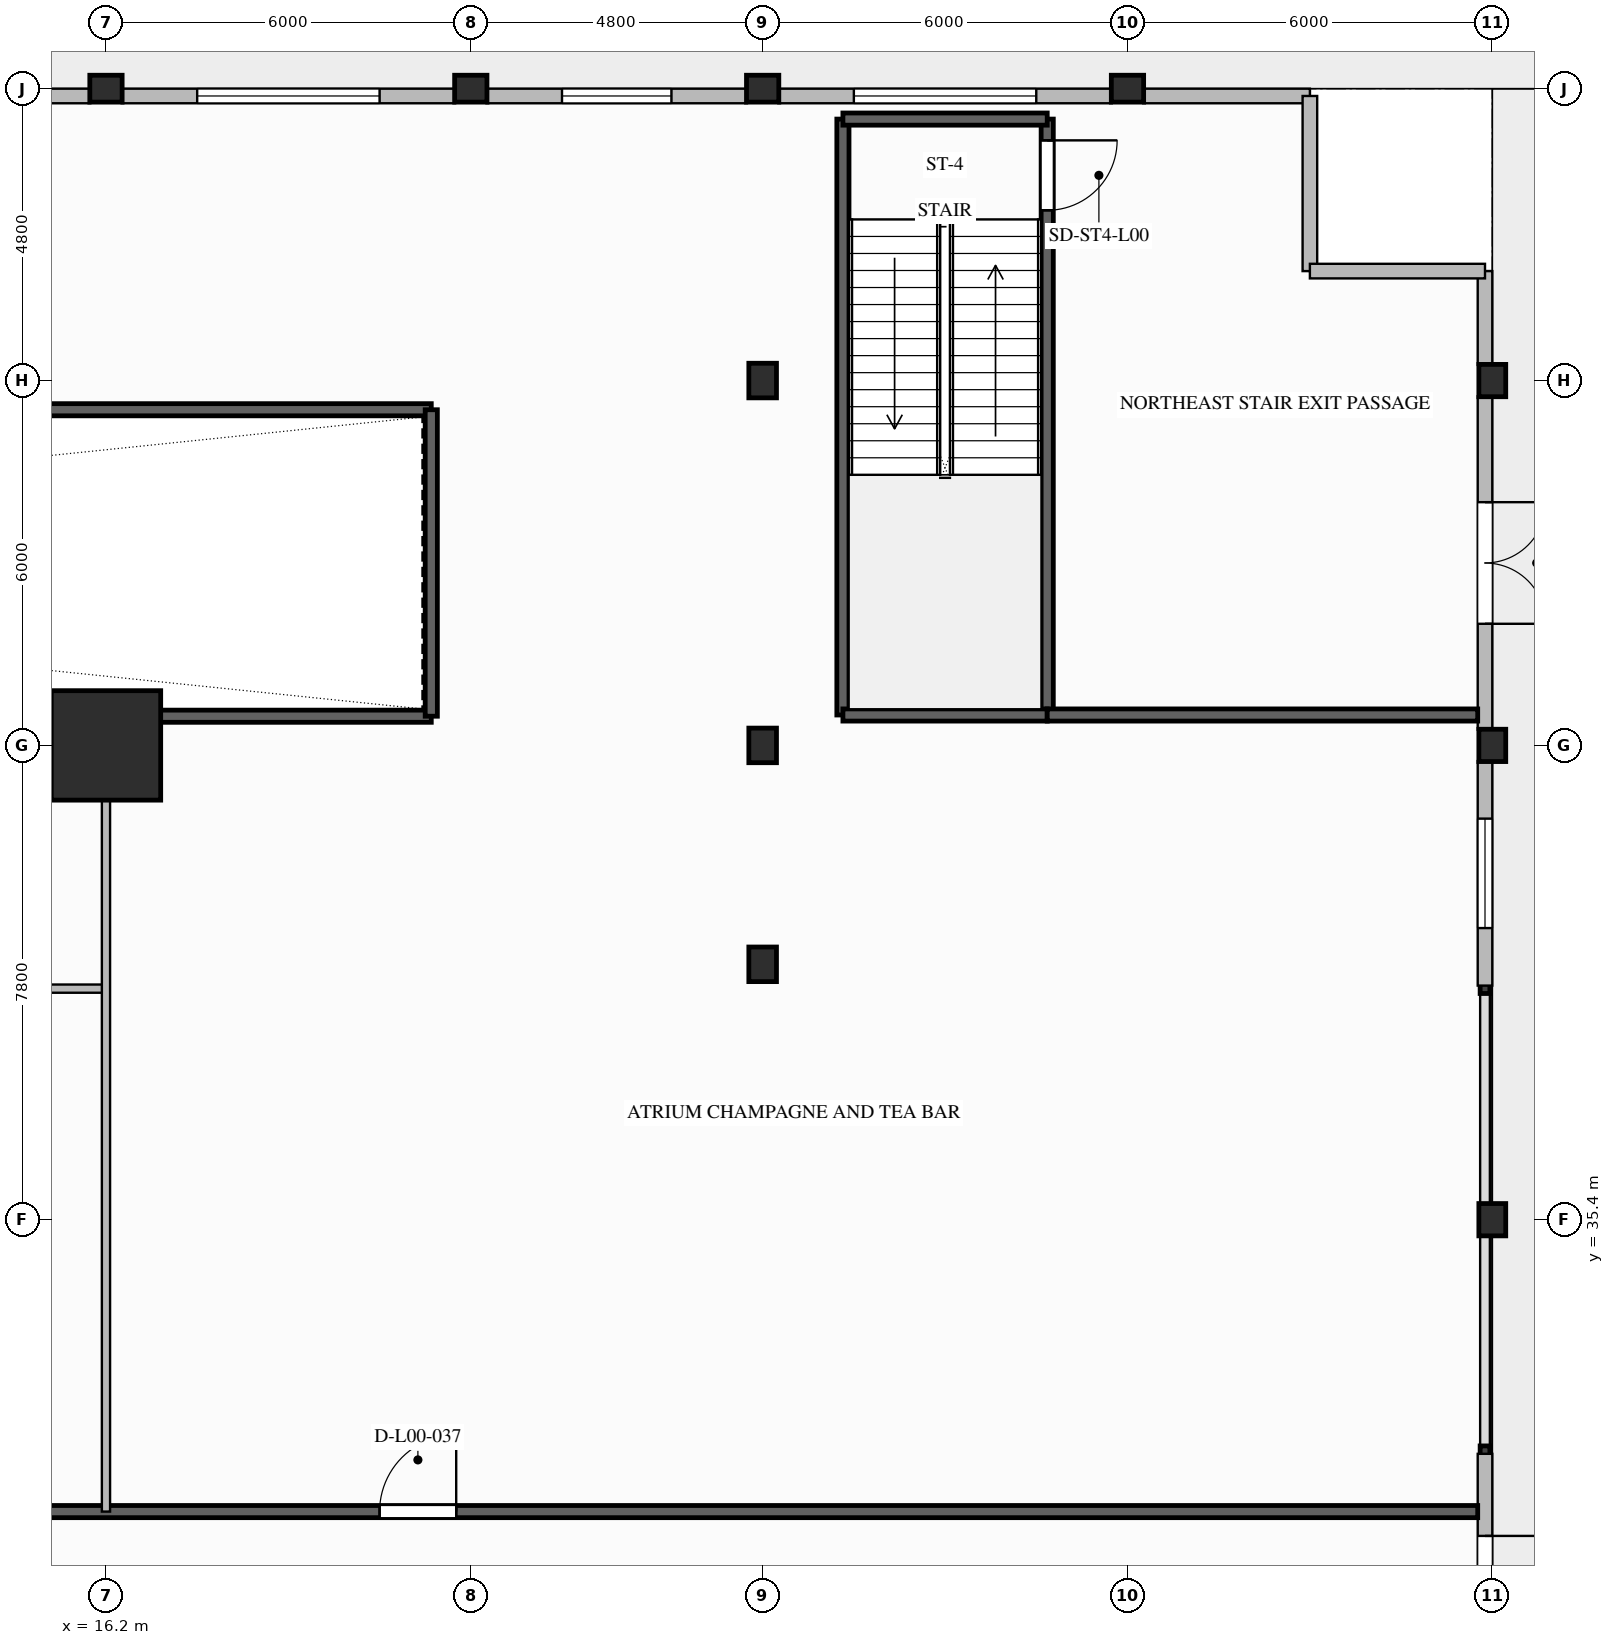
"""IFC4 building model, lengths in metres.
Left out: names, types, materials, properties, quantities, classifications, styles, units other than length and angle.
Written with IfcOpenShell. Run it as: python <this file> out.ifc"""

import sys

from ifc_helpers import new_model, si_unit, direction, frame, frame_2d, origin, origin_2d, place, context, subcontext, project, spatial, rectangle, i_section, extrude, element, fill, save


model = new_model("IFC4")
c1 = context("Model", 3, precision=1e-05, world=origin(), true_north=direction((0.0, 1.0)))
c2 = subcontext(c1, "Body", "Model", "MODEL_VIEW")
j1 = project(units=[si_unit("LENGTHUNIT", "METRE"), si_unit("PLANEANGLEUNIT", "RADIAN")], contexts=[c1])
p1 = place(None, origin())
s1 = spatial("IfcSite", under=j1, at=p1, CompositionType="ELEMENT")
p2 = place(p1, origin())
s2 = spatial("IfcBuilding", under=s1, at=p2, CompositionType="ELEMENT")
p3 = place(p2, origin())
s3 = spatial("IfcBuildingStorey", under=s2, at=p3, CompositionType="ELEMENT", Elevation=0.0)
p4 = place(p3, frame((16.2, 43.2, 0.0), z_axis=(0.0, 0.0, 1.0), x_axis=(1.0, 0.0, 0.0)))
e1 = element("IfcColumn", 1, at=p4, inside=s3, PredefinedType="COLUMN", context=c2, shape_type="SweptSolid", body=[
    extrude(rectangle(XDim=1.8, YDim=1.8, at=origin_2d()), origin(), (0.0, 0.0, 1.0), 5.6),
])
for number, where, z_axis, x_axis in (
    (2, (39.0, 35.4, 0.0), (0.0, 0.0, 1.0), (1.0, 0.0, 0.0)),
    (3, (39.0, 43.2, 0.0), (0.0, 0.0, 1.0), (1.0, 0.0, 0.0)),
    (4, (39.0, 49.2, 0.0), (0.0, 0.0, 1.0), (1.0, 0.0, 0.0)),
    (5, (16.2, 54.0, 0.0), (0.0, 0.0, 1.0), (0.0, 1.0, 0.0)),
    (6, (22.2, 54.0, 0.0), (0.0, 0.0, 1.0), (0.0, 1.0, 0.0)),
    (7, (27.0, 54.0, 0.0), (0.0, 0.0, 1.0), (0.0, 1.0, 0.0)),
    (8, (33.0, 54.0, 0.0), (0.0, 0.0, 1.0), (0.0, 1.0, 0.0)),
):
    element("IfcColumn", number, at=place(p3, frame(where, z_axis=z_axis, x_axis=x_axis)), inside=s3, PredefinedType="COLUMN", context=c2, shape_type="SweptSolid", body=[
        extrude(i_section(OverallWidth=0.442, OverallDepth=0.531, WebThickness=0.066, FlangeThickness=0.106, FilletRadius=0.03, at=origin_2d()), origin(), (0.0, 0.0, 1.0), 5.6),
    ])
for number, where, z_axis, x_axis in (
    (9, (27.0, 39.6, 0.0), (0.0, 0.0, 1.0), (1.0, 0.0, 0.0)),
    (10, (27.0, 43.2, 0.0), (0.0, 0.0, 1.0), (1.0, 0.0, 0.0)),
    (11, (27.0, 49.2, 0.0), (0.0, 0.0, 1.0), (1.0, 0.0, 0.0)),
):
    element("IfcColumn", number, at=place(p3, frame(where, z_axis=z_axis, x_axis=x_axis)), inside=s3, PredefinedType="COLUMN", context=c2, shape_type="SweptSolid", body=[
        extrude(i_section(OverallWidth=0.454, OverallDepth=0.569, WebThickness=0.078, FlangeThickness=0.125, FilletRadius=0.03, at=origin_2d()), origin(), (0.0, 0.0, 1.0), 5.6),
    ])
p5 = place(p3, frame((38.88, 31.55, 0.0), z_axis=(0.0, 0.0, 1.0), x_axis=(0.0, -1.0, 0.0)))
e12 = element("IfcWall", 12, at=p5, inside=s3, PredefinedType="STANDARD", context=c2, shape_type="SweptSolid", body=[
    extrude(rectangle(XDim=4.292, YDim=0.24, at=frame_2d((2.146, 0.0))), origin(), (0.0, 0.0, 1.0), 4.604),
])
p6 = place(p5, frame((1.35, 0.0, 0.0)))
e13 = element("IfcOpeningElement", 13, at=p6, cuts=e12, PredefinedType="OPENING", context=c2, shape_type="SweptSolid", body=[
    extrude(rectangle(XDim=2.0, YDim=2.4, at=frame_2d((1.0, 1.2))), frame((0.0, 0.13, 0.0), z_axis=(0.0, -1.0, 0.0), x_axis=(1.0, 0.0, 0.0)), (0.0, 0.0, 1.0), 0.26),
])
p7 = place(p3, frame((38.88, 42.942, 0.0), z_axis=(0.0, 0.0, 1.0), x_axis=(0.0, -1.0, 0.0)))
e14 = element("IfcWall", 14, at=p7, inside=s3, PredefinedType="STANDARD", context=c2, shape_type="SweptSolid", body=[
    extrude(rectangle(XDim=3.692, YDim=0.24, at=frame_2d((1.846, 0.0))), origin(), (0.0, 0.0, 1.0), 4.604),
])
p8 = place(p7, frame((0.946, 0.0, 0.9)))
e15 = element("IfcOpeningElement", 15, at=p8, cuts=e14, PredefinedType="OPENING", context=c2, shape_type="SweptSolid", body=[
    extrude(rectangle(XDim=1.8, YDim=2.4, at=frame_2d((0.9, 1.2))), frame((0.0, 0.13, 0.0), z_axis=(0.0, -1.0, 0.0), x_axis=(1.0, 0.0, 0.0)), (0.0, 0.0, 1.0), 0.26),
])
p9 = place(p3, frame((38.88, 48.942, 0.0), z_axis=(0.0, 0.0, 1.0), x_axis=(0.0, -1.0, 0.0)))
e16 = element("IfcWall", 16, at=p9, inside=s3, PredefinedType="STANDARD", context=c2, shape_type="SweptSolid", body=[
    extrude(rectangle(XDim=5.485, YDim=0.24, at=frame_2d((2.742, 0.0))), origin(), (0.0, 0.0, 1.0), 4.604),
])
p10 = place(p9, frame((1.742, 0.0, 0.0)))
e17 = element("IfcOpeningElement", 17, at=p10, cuts=e16, PredefinedType="OPENING", context=c2, shape_type="SweptSolid", body=[
    extrude(rectangle(XDim=2.0, YDim=2.4, at=frame_2d((1.0, 1.2))), frame((0.0, 0.13, 0.0), z_axis=(0.0, -1.0, 0.0), x_axis=(1.0, 0.0, 0.0)), (0.0, 0.0, 1.0), 0.26),
])
p11 = place(p3, frame((38.88, 51.0, 0.0), z_axis=(0.0, 0.0, 1.0), x_axis=(0.0, -1.0, 0.0)))
e18 = element("IfcWall", 18, at=p11, inside=s3, PredefinedType="STANDARD", context=c2, shape_type="SweptSolid", body=[
    extrude(rectangle(XDim=1.542, YDim=0.24, at=frame_2d((0.771, 0.0))), origin(), (0.0, 0.0, 1.0), 5.3),
])
p12 = place(p3, frame((8.658, 53.88, 0.0), z_axis=(0.0, 0.0, 1.0), x_axis=(1.0, 0.0, 0.0)))
e19 = element("IfcWall", 19, at=p12, inside=s3, PredefinedType="STANDARD", context=c2, shape_type="SweptSolid", body=[
    extrude(rectangle(XDim=7.285, YDim=0.24, at=frame_2d((3.642, 0.0))), origin(), (0.0, 0.0, 1.0), 4.604),
])
p13 = place(p12, frame((2.142, 0.0, 0.65)))
e20 = element("IfcOpeningElement", 20, at=p13, cuts=e19, PredefinedType="OPENING", context=c2, shape_type="SweptSolid", body=[
    extrude(rectangle(XDim=3.0, YDim=2.2, at=frame_2d((1.5, 1.1))), frame((0.0, 0.13, 0.0), z_axis=(0.0, -1.0, 0.0), x_axis=(1.0, 0.0, 0.0)), (0.0, 0.0, 1.0), 0.26),
])
p14 = place(p3, frame((16.458, 53.88, 0.0), z_axis=(0.0, 0.0, 1.0), x_axis=(1.0, 0.0, 0.0)))
e21 = element("IfcWall", 21, at=p14, inside=s3, PredefinedType="STANDARD", context=c2, shape_type="SweptSolid", body=[
    extrude(rectangle(XDim=5.485, YDim=0.24, at=frame_2d((2.742, 0.0))), origin(), (0.0, 0.0, 1.0), 4.604),
])
p15 = place(p14, frame((1.242, 0.0, 0.65)))
e22 = element("IfcOpeningElement", 22, at=p15, cuts=e21, PredefinedType="OPENING", context=c2, shape_type="SweptSolid", body=[
    extrude(rectangle(XDim=3.0, YDim=2.2, at=frame_2d((1.5, 1.1))), frame((0.0, 0.13, 0.0), z_axis=(0.0, -1.0, 0.0), x_axis=(1.0, 0.0, 0.0)), (0.0, 0.0, 1.0), 0.26),
])
p16 = place(p3, frame((22.458, 53.88, 0.0), z_axis=(0.0, 0.0, 1.0), x_axis=(1.0, 0.0, 0.0)))
e23 = element("IfcWall", 23, at=p16, inside=s3, PredefinedType="STANDARD", context=c2, shape_type="SweptSolid", body=[
    extrude(rectangle(XDim=4.284, YDim=0.24, at=frame_2d((2.142, 0.0))), origin(), (0.0, 0.0, 1.0), 4.604),
])
p17 = place(p16, frame((1.242, 0.0, 0.65)))
e24 = element("IfcOpeningElement", 24, at=p17, cuts=e23, PredefinedType="OPENING", context=c2, shape_type="SweptSolid", body=[
    extrude(rectangle(XDim=1.8, YDim=2.2, at=frame_2d((0.9, 1.1))), frame((0.0, 0.13, 0.0), z_axis=(0.0, -1.0, 0.0), x_axis=(1.0, 0.0, 0.0)), (0.0, 0.0, 1.0), 0.26),
])
p18 = place(p3, frame((27.258, 53.88, 0.0), z_axis=(0.0, 0.0, 1.0), x_axis=(1.0, 0.0, 0.0)))
e25 = element("IfcWall", 25, at=p18, inside=s3, PredefinedType="STANDARD", context=c2, shape_type="SweptSolid", body=[
    extrude(rectangle(XDim=5.484, YDim=0.24, at=frame_2d((2.742, 0.0))), origin(), (0.0, 0.0, 1.0), 4.604),
])
p19 = place(p18, frame((1.242, 0.0, 0.65)))
e26 = element("IfcOpeningElement", 26, at=p19, cuts=e25, PredefinedType="OPENING", context=c2, shape_type="SweptSolid", body=[
    extrude(rectangle(XDim=3.0, YDim=2.2, at=frame_2d((1.5, 1.1))), frame((0.0, 0.13, 0.0), z_axis=(0.0, -1.0, 0.0), x_axis=(1.0, 0.0, 0.0)), (0.0, 0.0, 1.0), 0.26),
])
p20 = place(p3, frame((33.258, 53.88, 0.0), z_axis=(0.0, 0.0, 1.0), x_axis=(1.0, 0.0, 0.0)))
e27 = element("IfcWall", 27, at=p20, inside=s3, PredefinedType="STANDARD", context=c2, shape_type="SweptSolid", body=[
    extrude(rectangle(XDim=2.742, YDim=0.24, at=frame_2d((1.371, 0.0))), origin(), (0.0, 0.0, 1.0), 5.3),
])
for number, where, z_axis, x_axis in (
    (28, (36.0, 53.88, 0.0), (0.0, 0.0, 1.0), (0.0, -1.0, 0.0)),
    (29, (36.0, 51.0, 0.0), (0.0, 0.0, 1.0), (1.0, 0.0, 0.0)),
):
    element("IfcWall", number, at=place(p3, frame(where, z_axis=z_axis, x_axis=x_axis)), inside=s3, PredefinedType="STANDARD", context=c2, shape_type="SweptSolid", body=[
        extrude(rectangle(XDim=2.88, YDim=0.24, at=frame_2d((1.44, 0.0))), origin(), (0.0, 0.0, 1.0), 5.3),
    ])
p21 = place(p3, frame((28.32, 43.7, 0.0), z_axis=(0.0, 0.0, 1.0), x_axis=(0.0, 1.0, 0.0)))
e30 = element("IfcWall", 30, at=p21, inside=s3, PredefinedType="SOLIDWALL", context=c2, shape_type="SweptSolid", body=[
    extrude(rectangle(XDim=9.8, YDim=0.2, at=frame_2d((4.9, 0.0))), origin(), (0.0, 0.0, 1.0), 5.3),
])
p22 = place(p3, frame((31.68, 53.5, 0.0), z_axis=(0.0, 0.0, 1.0), x_axis=(0.0, -1.0, 0.0)))
e31 = element("IfcWall", 31, at=p22, inside=s3, PredefinedType="SOLIDWALL", context=c2, shape_type="SweptSolid", body=[
    extrude(rectangle(XDim=9.8, YDim=0.2, at=frame_2d((4.9, 0.0))), origin(), (0.0, 0.0, 1.0), 5.3),
])
p23 = place(p22, frame((0.35, 0.0, 0.0)))
e32 = element("IfcOpeningElement", 32, at=p23, cuts=e31, PredefinedType="OPENING", context=c2, shape_type="SweptSolid", body=[
    extrude(rectangle(XDim=1.15, YDim=2.15, at=frame_2d((0.575, 1.075))), frame((0.0, 0.11, 0.0), z_axis=(0.0, -1.0, 0.0), x_axis=(1.0, 0.0, 0.0)), (0.0, 0.0, 1.0), 0.22),
])
for number, where, z_axis, x_axis in (
    (33, (28.32, 43.7, 0.0), (0.0, 0.0, 1.0), (1.0, 0.0, 0.0)),
    (34, (31.68, 53.5, 0.0), (0.0, 0.0, 1.0), (-1.0, 0.0, 0.0)),
):
    element("IfcWall", number, at=place(p3, frame(where, z_axis=z_axis, x_axis=x_axis)), inside=s3, PredefinedType="SOLIDWALL", context=c2, shape_type="SweptSolid", body=[
        extrude(rectangle(XDim=3.36, YDim=0.2, at=frame_2d((1.68, 0.0))), origin(), (0.0, 0.0, 1.0), 5.3),
    ])
for number, where, z_axis, x_axis in (
    (35, (-26.76, 43.68, 0.0), (0.0, 0.0, 1.0), (1.0, 0.0, 0.0)),
    (36, (-26.76, 48.72, 0.0), (0.0, 0.0, 1.0), (1.0, 0.0, 0.0)),
):
    element("IfcWall", number, at=place(p3, frame(where, z_axis=z_axis, x_axis=x_axis)), inside=s3, PredefinedType="SOLIDWALL", context=c2, shape_type="SweptSolid", body=[
        extrude(rectangle(XDim=48.31, YDim=0.2, at=frame_2d((24.155, 0.0))), origin(), (0.0, 0.0, 1.0), 5.3),
    ])
p24 = place(p3, frame((21.55, 43.68, 0.0), z_axis=(0.0, 0.0, 1.0), x_axis=(0.0, 1.0, 0.0)))
e37 = element("IfcWall", 37, at=p24, inside=s3, PredefinedType="SOLIDWALL", context=c2, shape_type="SweptSolid", body=[
    extrude(rectangle(XDim=5.04, YDim=0.2, at=frame_2d((2.52, 0.0))), origin(), (0.0, 0.0, 1.0), 5.3),
])
p25 = place(p3, frame((31.68, 43.7, 0.0), z_axis=(0.0, 0.0, 1.0), x_axis=(1.0, 0.0, 0.0)))
e38 = element("IfcWall", 38, at=p25, inside=s3, PredefinedType="SOLIDWALL", context=c2, shape_type="SweptSolid", body=[
    extrude(rectangle(XDim=7.08, YDim=0.2, at=frame_2d((3.54, 0.0))), origin(), (0.0, 0.0, 1.0), 5.3),
])
p26 = place(p3, frame((8.7, 30.6, 0.0), z_axis=(0.0, 0.0, 1.0), x_axis=(1.0, 0.0, 0.0)))
e39 = element("IfcWall", 39, at=p26, inside=s3, PredefinedType="SOLIDWALL", context=c2, shape_type="SweptSolid", body=[
    extrude(rectangle(XDim=30.06, YDim=0.2, at=frame_2d((15.03, 0.0))), origin(), (0.0, 0.0, 1.0), 5.3),
])
p27 = place(p26, frame((12.0, 0.0, 0.0)))
e40 = element("IfcOpeningElement", 40, at=p27, cuts=e39, PredefinedType="OPENING", context=c2, shape_type="SweptSolid", body=[
    extrude(rectangle(XDim=1.26, YDim=2.2, at=frame_2d((0.63, 1.1))), frame((0.0, 0.11, 0.0), z_axis=(0.0, -1.0, 0.0), x_axis=(1.0, 0.0, 0.0)), (0.0, 0.0, 1.0), 0.22),
])
p28 = place(p3, frame((-16.2, 39.2, 0.0), z_axis=(0.0, 0.0, 1.0), x_axis=(1.0, 0.0, 0.0)))
e41 = element("IfcWall", 41, at=p28, inside=s3, PredefinedType="PARTITIONING", context=c2, shape_type="SweptSolid", body=[
    extrude(rectangle(XDim=32.4, YDim=0.135, at=frame_2d((16.2, 0.0))), origin(), (0.0, 0.0, 1.0), 5.3),
])
p29 = place(p28, frame((6.0, 0.0, 0.0)))
e42 = element("IfcOpeningElement", 42, at=p29, cuts=e41, PredefinedType="OPENING", context=c2, shape_type="SweptSolid", body=[
    extrude(rectangle(XDim=1.02, YDim=2.15, at=frame_2d((0.51, 1.075))), frame((0.0, 0.077, 0.0), z_axis=(0.0, -1.0, 0.0), x_axis=(1.0, 0.0, 0.0)), (0.0, 0.0, 1.0), 0.155),
])
p30 = place(p28, frame((18.8, 0.0, 0.0)))
e43 = element("IfcOpeningElement", 43, at=p30, cuts=e41, PredefinedType="OPENING", context=c2, shape_type="SweptSolid", body=[
    extrude(rectangle(XDim=0.92, YDim=2.1, at=frame_2d((0.46, 1.05))), frame((0.0, 0.077, 0.0), z_axis=(0.0, -1.0, 0.0), x_axis=(1.0, 0.0, 0.0)), (0.0, 0.0, 1.0), 0.155),
])
p31 = place(p28, frame((24.5, 0.0, 0.0)))
e44 = element("IfcOpeningElement", 44, at=p31, cuts=e41, PredefinedType="OPENING", context=c2, shape_type="SweptSolid", body=[
    extrude(rectangle(XDim=0.98, YDim=2.1, at=frame_2d((0.49, 1.05))), frame((0.0, 0.077, 0.0), z_axis=(0.0, -1.0, 0.0), x_axis=(1.0, 0.0, 0.0)), (0.0, 0.0, 1.0), 0.155),
])
p32 = place(p28, frame((28.9, 0.0, 0.0)))
e45 = element("IfcOpeningElement", 45, at=p32, cuts=e41, PredefinedType="OPENING", context=c2, shape_type="SweptSolid", body=[
    extrude(rectangle(XDim=1.02, YDim=2.15, at=frame_2d((0.51, 1.075))), frame((0.0, 0.077, 0.0), z_axis=(0.0, -1.0, 0.0), x_axis=(1.0, 0.0, 0.0)), (0.0, 0.0, 1.0), 0.155),
])
p33 = place(p3, frame((16.2, 30.6, 0.0), z_axis=(0.0, 0.0, 1.0), x_axis=(0.0, 1.0, 0.0)))
e46 = element("IfcWall", 46, at=p33, inside=s3, PredefinedType="PARTITIONING", context=c2, shape_type="SweptSolid", body=[
    extrude(rectangle(XDim=13.08, YDim=0.135, at=frame_2d((6.54, 0.0))), origin(), (0.0, 0.0, 1.0), 4.337),
])
p34 = place(p6, origin())
e47 = element("IfcDoor", 47, at=p34, inside=s3, OperationType="DOUBLE_DOOR_SINGLE_SWING", PredefinedType="DOOR", context=c2, shape_type="SweptSolid", body=[
    extrude(rectangle(XDim=2.0, YDim=2.4, at=frame_2d((1.0, 1.2))), frame((0.0, 0.025, 0.0), z_axis=(0.0, -1.0, 0.0), x_axis=(1.0, 0.0, 0.0)), (0.0, 0.0, 1.0), 0.05),
])
fill(e13, e47)
p35 = place(p8, origin())
e48 = element("IfcWindow", 48, at=p35, inside=s3, PartitioningType="SINGLE_PANEL", PredefinedType="WINDOW", context=c2, shape_type="SweptSolid", body=[
    extrude(rectangle(XDim=1.8, YDim=2.4, at=frame_2d((0.9, 1.2))), frame((0.0, 0.03, 0.0), z_axis=(0.0, -1.0, 0.0), x_axis=(1.0, 0.0, 0.0)), (0.0, 0.0, 1.0), 0.06),
])
fill(e15, e48)
p36 = place(p10, origin())
e49 = element("IfcDoor", 49, at=p36, inside=s3, OperationType="DOUBLE_DOOR_SINGLE_SWING", PredefinedType="DOOR", context=c2, shape_type="SweptSolid", body=[
    extrude(rectangle(XDim=2.0, YDim=2.4, at=frame_2d((1.0, 1.2))), frame((0.0, 0.025, 0.0), z_axis=(0.0, -1.0, 0.0), x_axis=(1.0, 0.0, 0.0)), (0.0, 0.0, 1.0), 0.05),
])
fill(e17, e49)
p37 = place(p15, origin())
e50 = element("IfcWindow", 50, at=p37, inside=s3, PartitioningType="SINGLE_PANEL", PredefinedType="WINDOW", context=c2, shape_type="SweptSolid", body=[
    extrude(rectangle(XDim=3.0, YDim=2.2, at=frame_2d((1.5, 1.1))), frame((0.0, 0.03, 0.0), z_axis=(0.0, -1.0, 0.0), x_axis=(1.0, 0.0, 0.0)), (0.0, 0.0, 1.0), 0.06),
])
fill(e22, e50)
p38 = place(p17, origin())
e51 = element("IfcWindow", 51, at=p38, inside=s3, PartitioningType="SINGLE_PANEL", PredefinedType="WINDOW", context=c2, shape_type="SweptSolid", body=[
    extrude(rectangle(XDim=1.8, YDim=2.2, at=frame_2d((0.9, 1.1))), frame((0.0, 0.03, 0.0), z_axis=(0.0, -1.0, 0.0), x_axis=(1.0, 0.0, 0.0)), (0.0, 0.0, 1.0), 0.06),
])
fill(e24, e51)
p39 = place(p19, origin())
e52 = element("IfcWindow", 52, at=p39, inside=s3, PartitioningType="SINGLE_PANEL", PredefinedType="WINDOW", context=c2, shape_type="SweptSolid", body=[
    extrude(rectangle(XDim=3.0, YDim=2.2, at=frame_2d((1.5, 1.1))), frame((0.0, 0.03, 0.0), z_axis=(0.0, -1.0, 0.0), x_axis=(1.0, 0.0, 0.0)), (0.0, 0.0, 1.0), 0.06),
])
fill(e26, e52)
p40 = place(p23, origin())
e53 = element("IfcDoor", 53, at=p40, inside=s3, OperationType="SINGLE_SWING_LEFT", PredefinedType="DOOR", context=c2, shape_type="SweptSolid", body=[
    extrude(rectangle(XDim=1.15, YDim=2.15, at=frame_2d((0.575, 1.075))), frame((0.0, 0.025, 0.0), z_axis=(0.0, -1.0, 0.0), x_axis=(1.0, 0.0, 0.0)), (0.0, 0.0, 1.0), 0.05),
])
fill(e32, e53)
p41 = place(p27, origin())
e54 = element("IfcDoor", 54, at=p41, inside=s3, OperationType="SINGLE_SWING_RIGHT", PredefinedType="DOOR", context=c2, shape_type="SweptSolid", body=[
    extrude(rectangle(XDim=1.26, YDim=2.2, at=frame_2d((0.63, 1.1))), frame((0.0, 0.025, 0.0), z_axis=(0.0, -1.0, 0.0), x_axis=(1.0, 0.0, 0.0)), (0.0, 0.0, 1.0), 0.05),
])
fill(e40, e54)
save(model, sys.argv[1])
